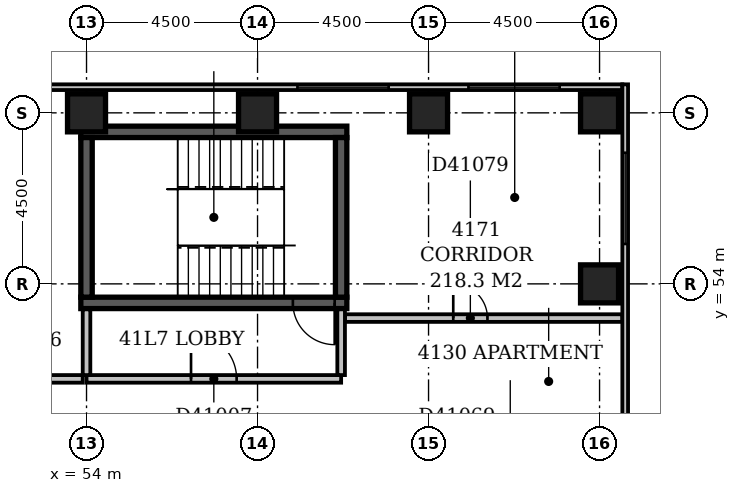
"""IFC4 building model, lengths in metres.
Left out: names, types, materials, properties, quantities, classifications, styles, units other than length and angle.
Written with IfcOpenShell. Run it as: python <this file> out.ifc"""

import sys

from ifc_helpers import new_model, si_unit, direction, frame, frame_2d, origin, origin_2d, place, context, subcontext, project, spatial, rectangle, extrude, element, fill, save


model = new_model("IFC4")
c1 = context("Model", 3, precision=1e-05, world=origin(), true_north=direction((0.0, 1.0)))
c2 = subcontext(c1, "Body", "Model", "MODEL_VIEW")
j1 = project(units=[si_unit("LENGTHUNIT", "METRE"), si_unit("PLANEANGLEUNIT", "RADIAN")], contexts=[c1])
p1 = place(None, origin())
s1 = spatial("IfcSite", under=j1, at=p1, CompositionType="ELEMENT")
p2 = place(p1, origin())
s2 = spatial("IfcBuilding", under=s1, at=p2, CompositionType="ELEMENT")
p3 = place(p2, frame((0.0, 0.0, 162.8)))
s3 = spatial("IfcBuildingStorey", under=s2, at=p3, CompositionType="ELEMENT", Elevation=162.8)
p4 = place(p3, frame((53.85, 53.5, -0.3), z_axis=(0.0, 0.0, 1.0), x_axis=(1.0, 0.0, 0.0)))
e1 = element("IfcWall", 1, at=p4, inside=s3, PredefinedType="SHEAR", context=c2, shape_type="SweptSolid", body=[
    extrude(rectangle(XDim=7.0, YDim=0.3, at=frame_2d((3.5, 0.0))), origin(), (0.0, 0.0, 1.0), 3.6),
])
p5 = place(p4, frame((5.58, 0.0, 0.3)))
e2 = element("IfcOpeningElement", 2, at=p5, cuts=e1, PredefinedType="OPENING", context=c2, shape_type="SweptSolid", body=[
    extrude(rectangle(XDim=1.1, YDim=2.1, at=frame_2d((0.55, 1.05))), frame((0.0, 0.162, 0.0), z_axis=(0.0, -1.0, 0.0), x_axis=(1.0, 0.0, 0.0)), (0.0, 0.0, 1.0), 0.324),
])
p6 = place(p3, frame((53.85, 58.0, -0.3), z_axis=(0.0, 0.0, 1.0), x_axis=(1.0, 0.0, 0.0)))
e3 = element("IfcWall", 3, at=p6, inside=s3, PredefinedType="SHEAR", context=c2, shape_type="SweptSolid", body=[
    extrude(rectangle(XDim=7.0, YDim=0.3, at=frame_2d((3.5, 0.0))), origin(), (0.0, 0.0, 1.0), 3.6),
])
for number, where, z_axis, x_axis in (
    (4, (54.0, 53.65, -0.3), (0.0, 0.0, 1.0), (0.0, 1.0, 0.0)),
    (5, (60.7, 53.65, -0.3), (0.0, 0.0, 1.0), (0.0, 1.0, 0.0)),
):
    element("IfcWall", number, at=place(p3, frame(where, z_axis=z_axis, x_axis=x_axis)), inside=s3, PredefinedType="SHEAR", context=c2, shape_type="SweptSolid", body=[
        extrude(rectangle(XDim=4.2, YDim=0.3, at=frame_2d((2.1, 0.0))), origin(), (0.0, 0.0, 1.0), 3.6),
    ])
for number, where, z_axis, x_axis in (
    (6, (67.5, 54.0, -0.3), (0.0, 0.0, 1.0), (1.0, 0.0, 0.0)),
    (7, (54.0, 58.5, -0.3), (0.0, 0.0, 1.0), (1.0, 0.0, 0.0)),
    (8, (58.5, 58.5, -0.3), (0.0, 0.0, 1.0), (1.0, 0.0, 0.0)),
    (9, (63.0, 58.5, -0.3), (0.0, 0.0, 1.0), (1.0, 0.0, 0.0)),
    (10, (67.5, 58.5, -0.3), (0.0, 0.0, 1.0), (1.0, 0.0, 0.0)),
):
    element("IfcColumn", number, at=place(p3, frame(where, z_axis=z_axis, x_axis=x_axis)), inside=s3, PredefinedType="COLUMN", context=c2, shape_type="SweptSolid", body=[
        extrude(rectangle(XDim=1.0, YDim=1.0, at=origin_2d()), origin(), (0.0, 0.0, 1.0), 3.6),
    ])
p7 = place(p3, frame((68.175, 35.4, 0.0), z_axis=(0.0, 0.0, 1.0), x_axis=(0.0, 1.0, 0.0)))
e11 = element("IfcWall", 11, at=p7, inside=s3, PredefinedType="STANDARD", context=c2, shape_type="SweptSolid", body=[
    extrude(rectangle(XDim=23.85, YDim=0.15, at=frame_2d((11.925, 0.0))), origin(), (0.0, 0.0, 1.0), 2.7),
])
p8 = place(p7, frame((1.65, 0.0, 0.6)))
e12 = element("IfcOpeningElement", 12, at=p8, cuts=e11, PredefinedType="OPENING", context=c2, shape_type="SweptSolid", body=[
    extrude(rectangle(XDim=2.4, YDim=1.8, at=frame_2d((1.2, 0.9))), frame((0.0, 0.087, 0.0), z_axis=(0.0, -1.0, 0.0), x_axis=(1.0, 0.0, 0.0)), (0.0, 0.0, 1.0), 0.174),
])
p9 = place(p7, frame((19.65, 0.0, 0.6)))
e13 = element("IfcOpeningElement", 13, at=p9, cuts=e11, PredefinedType="OPENING", context=c2, shape_type="SweptSolid", body=[
    extrude(rectangle(XDim=2.4, YDim=1.8, at=frame_2d((1.2, 0.9))), frame((0.0, 0.087, 0.0), z_axis=(0.0, -1.0, 0.0), x_axis=(1.0, 0.0, 0.0)), (0.0, 0.0, 1.0), 0.174),
])
p10 = place(p3, frame((68.1, 59.175, 0.0), z_axis=(0.0, 0.0, 1.0), x_axis=(-1.0, 0.0, 0.0)))
e14 = element("IfcWall", 14, at=p10, inside=s3, PredefinedType="STANDARD", context=c2, shape_type="SweptSolid", body=[
    extrude(rectangle(XDim=68.85, YDim=0.15, at=frame_2d((34.425, 0.0))), origin(), (0.0, 0.0, 1.0), 2.7),
])
p11 = place(p10, frame((1.65, 0.0, 0.6)))
e15 = element("IfcOpeningElement", 15, at=p11, cuts=e14, PredefinedType="OPENING", context=c2, shape_type="SweptSolid", body=[
    extrude(rectangle(XDim=2.4, YDim=1.8, at=frame_2d((1.2, 0.9))), frame((0.0, 0.087, 0.0), z_axis=(0.0, -1.0, 0.0), x_axis=(1.0, 0.0, 0.0)), (0.0, 0.0, 1.0), 0.174),
])
p12 = place(p10, frame((6.15, 0.0, 0.6)))
e16 = element("IfcOpeningElement", 16, at=p12, cuts=e14, PredefinedType="OPENING", context=c2, shape_type="SweptSolid", body=[
    extrude(rectangle(XDim=2.4, YDim=1.8, at=frame_2d((1.2, 0.9))), frame((0.0, 0.087, 0.0), z_axis=(0.0, -1.0, 0.0), x_axis=(1.0, 0.0, 0.0)), (0.0, 0.0, 1.0), 0.174),
])
p13 = place(p10, frame((37.78, 0.0, 0.6)))
e17 = element("IfcOpeningElement", 17, at=p13, cuts=e14, PredefinedType="OPENING", context=c2, shape_type="SweptSolid", body=[
    extrude(rectangle(XDim=1.2, YDim=1.8, at=frame_2d((0.6, 0.9))), frame((0.0, 0.087, 0.0), z_axis=(0.0, -1.0, 0.0), x_axis=(1.0, 0.0, 0.0)), (0.0, 0.0, 1.0), 0.174),
])
p14 = place(p3, frame((54.0, 51.5, 0.0), z_axis=(0.0, 0.0, 1.0), x_axis=(1.0, 0.0, 0.0)))
e18 = element("IfcWall", 18, at=p14, inside=s3, PredefinedType="PARTITIONING", context=c2, shape_type="SweptSolid", body=[
    extrude(rectangle(XDim=6.7, YDim=0.2, at=frame_2d((3.35, 0.0))), origin(), (0.0, 0.0, 1.0), 3.3),
])
p15 = place(p14, frame((2.75, 0.0, 0.0)))
e19 = element("IfcOpeningElement", 19, at=p15, cuts=e18, PredefinedType="OPENING", context=c2, shape_type="SweptSolid", body=[
    extrude(rectangle(XDim=1.2, YDim=2.1, at=frame_2d((0.6, 1.05))), frame((0.0, 0.112, 0.0), z_axis=(0.0, -1.0, 0.0), x_axis=(1.0, 0.0, 0.0)), (0.0, 0.0, 1.0), 0.224),
])
p16 = place(p3, frame((60.7, 51.6, 0.0), z_axis=(0.0, 0.0, 1.0), x_axis=(0.0, 1.0, 0.0)))
e20 = element("IfcWall", 20, at=p16, inside=s3, PredefinedType="PARTITIONING", context=c2, shape_type="SweptSolid", body=[
    extrude(rectangle(XDim=1.73, YDim=0.2, at=frame_2d((0.865, 0.0))), origin(), (0.0, 0.0, 1.0), 3.3),
])
p17 = place(p3, frame((54.0, 51.6, 0.0), z_axis=(0.0, 0.0, 1.0), x_axis=(0.0, 1.0, 0.0)))
e21 = element("IfcWall", 21, at=p17, inside=s3, PredefinedType="PARTITIONING", context=c2, shape_type="SweptSolid", body=[
    extrude(rectangle(XDim=1.73, YDim=0.2, at=frame_2d((0.865, 0.0))), origin(), (0.0, 0.0, 1.0), 2.6),
])
p18 = place(p3, frame((44.1, 51.5, 0.0), z_axis=(0.0, 0.0, 1.0), x_axis=(1.0, 0.0, 0.0)))
e22 = element("IfcWall", 22, at=p18, inside=s3, PredefinedType="PARTITIONING", context=c2, shape_type="SweptSolid", body=[
    extrude(rectangle(XDim=9.8, YDim=0.2, at=frame_2d((4.9, 0.0))), origin(), (0.0, 0.0, 1.0), 3.3),
])
p19 = place(p18, frame((7.725, 0.0, 0.0)))
e23 = element("IfcOpeningElement", 23, at=p19, cuts=e22, PredefinedType="OPENING", context=c2, shape_type="SweptSolid", body=[
    extrude(rectangle(XDim=1.0, YDim=2.1, at=frame_2d((0.5, 1.05))), frame((0.0, 0.112, 0.0), z_axis=(0.0, -1.0, 0.0), x_axis=(1.0, 0.0, 0.0)), (0.0, 0.0, 1.0), 0.224),
])
p20 = place(p18, frame((1.075, 0.0, 0.0)))
e24 = element("IfcOpeningElement", 24, at=p20, cuts=e22, PredefinedType="OPENING", context=c2, shape_type="SweptSolid", body=[
    extrude(rectangle(XDim=1.0, YDim=2.1, at=frame_2d((0.5, 1.05))), frame((0.0, 0.112, 0.0), z_axis=(0.0, -1.0, 0.0), x_axis=(1.0, 0.0, 0.0)), (0.0, 0.0, 1.0), 0.224),
])
p21 = place(p18, frame((4.6, 0.0, 0.0)))
e25 = element("IfcOpeningElement", 25, at=p21, cuts=e22, PredefinedType="OPENING", context=c2, shape_type="SweptSolid", body=[
    extrude(rectangle(XDim=1.0, YDim=2.1, at=frame_2d((0.5, 1.05))), frame((0.0, 0.112, 0.0), z_axis=(0.0, -1.0, 0.0), x_axis=(1.0, 0.0, 0.0)), (0.0, 0.0, 1.0), 0.224),
])
p22 = place(p3, frame((60.8, 53.1, 0.0), z_axis=(0.0, 0.0, 1.0), x_axis=(1.0, 0.0, 0.0)))
e26 = element("IfcWall", 26, at=p22, inside=s3, PredefinedType="PARTITIONING", context=c2, shape_type="SweptSolid", body=[
    extrude(rectangle(XDim=7.3, YDim=0.2, at=frame_2d((3.65, 0.0))), origin(), (0.0, 0.0, 1.0), 3.3),
])
p23 = place(p22, frame((2.85, 0.0, 0.0)))
e27 = element("IfcOpeningElement", 27, at=p23, cuts=e26, PredefinedType="OPENING", context=c2, shape_type="SweptSolid", body=[
    extrude(rectangle(XDim=0.9, YDim=2.1, at=frame_2d((0.45, 1.05))), frame((0.0, 0.112, 0.0), z_axis=(0.0, -1.0, 0.0), x_axis=(1.0, 0.0, 0.0)), (0.0, 0.0, 1.0), 0.224),
])
p24 = place(p9, origin())
e28 = element("IfcWindow", 28, at=p24, inside=s3, PartitioningType="SINGLE_PANEL", PredefinedType="WINDOW", context=c2, shape_type="SweptSolid", body=[
    extrude(rectangle(XDim=2.4, YDim=1.8, at=frame_2d((1.2, 0.9))), frame((0.0, 0.03, 0.0), z_axis=(0.0, -1.0, 0.0), x_axis=(1.0, 0.0, 0.0)), (0.0, 0.0, 1.0), 0.06),
])
fill(e13, e28)
p25 = place(p11, origin())
e29 = element("IfcWindow", 29, at=p25, inside=s3, PartitioningType="SINGLE_PANEL", PredefinedType="WINDOW", context=c2, shape_type="SweptSolid", body=[
    extrude(rectangle(XDim=2.4, YDim=1.8, at=frame_2d((1.2, 0.9))), frame((0.0, 0.03, 0.0), z_axis=(0.0, -1.0, 0.0), x_axis=(1.0, 0.0, 0.0)), (0.0, 0.0, 1.0), 0.06),
])
fill(e15, e29)
p26 = place(p12, origin())
e30 = element("IfcWindow", 30, at=p26, inside=s3, PartitioningType="SINGLE_PANEL", PredefinedType="WINDOW", context=c2, shape_type="SweptSolid", body=[
    extrude(rectangle(XDim=2.4, YDim=1.8, at=frame_2d((1.2, 0.9))), frame((0.0, 0.03, 0.0), z_axis=(0.0, -1.0, 0.0), x_axis=(1.0, 0.0, 0.0)), (0.0, 0.0, 1.0), 0.06),
])
fill(e16, e30)
p27 = place(p15, origin())
e31 = element("IfcDoor", 31, at=p27, inside=s3, OperationType="SINGLE_SWING_LEFT", PredefinedType="DOOR", context=c2, shape_type="SweptSolid", body=[
    extrude(rectangle(XDim=1.2, YDim=2.1, at=frame_2d((0.6, 1.05))), frame((0.0, 0.025, 0.0), z_axis=(0.0, -1.0, 0.0), x_axis=(1.0, 0.0, 0.0)), (0.0, 0.0, 1.0), 0.05),
])
fill(e19, e31)
p28 = place(p5, origin())
e32 = element("IfcDoor", 32, at=p28, inside=s3, OperationType="SINGLE_SWING_RIGHT", PredefinedType="DOOR", context=c2, shape_type="SweptSolid", body=[
    extrude(rectangle(XDim=1.1, YDim=2.1, at=frame_2d((0.55, 1.05))), frame((0.0, 0.025, 0.0), z_axis=(0.0, -1.0, 0.0), x_axis=(1.0, 0.0, 0.0)), (0.0, 0.0, 1.0), 0.05),
])
fill(e2, e32)
p29 = place(p23, origin())
e33 = element("IfcDoor", 33, at=p29, inside=s3, OperationType="SINGLE_SWING_LEFT", PredefinedType="DOOR", context=c2, shape_type="SweptSolid", body=[
    extrude(rectangle(XDim=0.9, YDim=2.1, at=frame_2d((0.45, 1.05))), frame((0.0, 0.025, 0.0), z_axis=(0.0, -1.0, 0.0), x_axis=(1.0, 0.0, 0.0)), (0.0, 0.0, 1.0), 0.05),
])
fill(e27, e33)
save(model, sys.argv[1])
